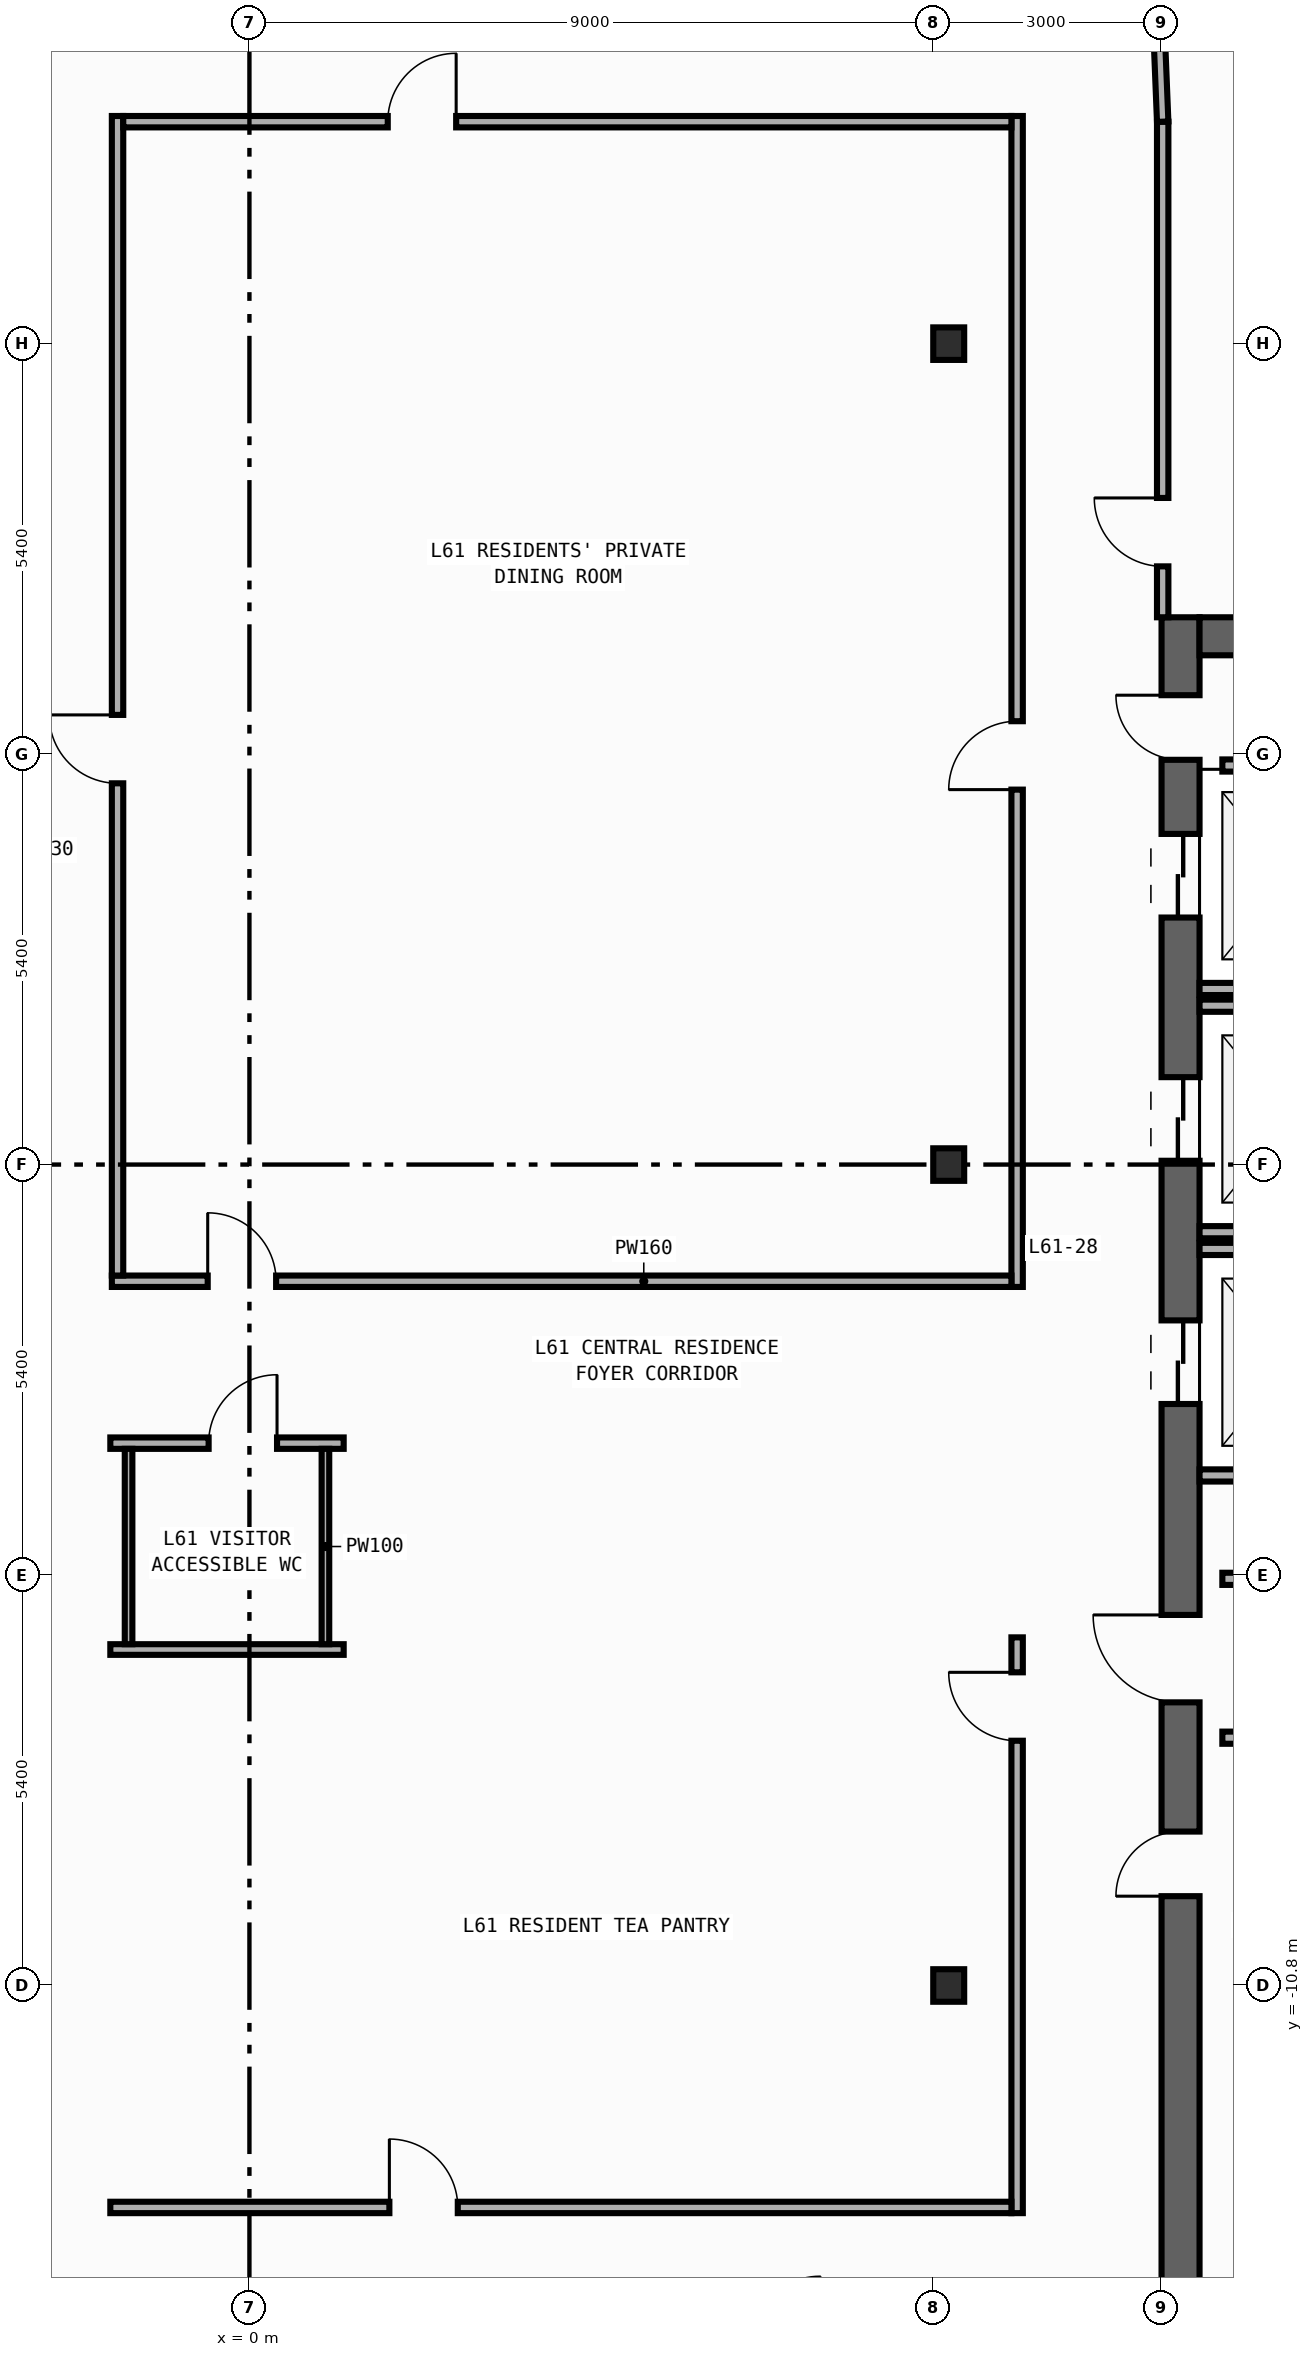
"""IFC4 building model, lengths in metres.
Left out: names, types, materials, properties, quantities, classifications, styles, units other than length and angle.
Written with IfcOpenShell. Run it as: python <this file> out.ifc"""

import sys

from ifc_helpers import new_model, si_unit, direction, frame, frame_2d, origin, origin_2d, place, context, subcontext, project, spatial, rectangle, i_section, extrude, element, fill, save


model = new_model("IFC4")
c1 = context("Model", 3, precision=1e-05, world=origin(), true_north=direction((0.0, 1.0)))
c2 = subcontext(c1, "Body", "Model", "MODEL_VIEW")
j1 = project(units=[si_unit("LENGTHUNIT", "METRE"), si_unit("PLANEANGLEUNIT", "RADIAN")], contexts=[c1])
p1 = place(None, origin())
s1 = spatial("IfcSite", under=j1, at=p1, CompositionType="ELEMENT")
p2 = place(p1, origin())
s2 = spatial("IfcBuilding", under=s1, at=p2, CompositionType="ELEMENT")
p3 = place(p2, frame((0.0, 0.0, 258.4)))
s3 = spatial("IfcBuildingStorey", under=s2, at=p3, CompositionType="ELEMENT", Elevation=258.4)
p4 = place(p3, frame((12.25, -19.8, 0.0), z_axis=(0.0, 0.0, 1.0), x_axis=(0.0, 1.0, 0.0)))
e1 = element("IfcWall", 1, at=p4, inside=s3, PredefinedType="SHEAR", context=c2, shape_type="SweptSolid", body=[
    extrude(rectangle(XDim=27.0, YDim=0.5, at=frame_2d((13.5, 0.0))), origin(), (0.0, 0.0, 1.0), 3.34),
])
p5 = place(p4, frame((23.05, 0.0, 0.0)))
e2 = element("IfcOpeningElement", 2, at=p5, cuts=e1, PredefinedType="OPENING", context=c2, shape_type="SweptSolid", body=[
    extrude(rectangle(XDim=1.1, YDim=2.2, at=frame_2d((0.55, 1.1))), frame((0.0, 0.26, 0.0), z_axis=(0.0, -1.0, 0.0), x_axis=(1.0, 0.0, 0.0)), (0.0, 0.0, 1.0), 0.52),
])
p6 = place(p4, frame((19.85, 0.0, 0.0)))
e3 = element("IfcOpeningElement", 3, at=p6, cuts=e1, PredefinedType="OPENING", context=c2, shape_type="SweptSolid", body=[
    extrude(rectangle(XDim=1.1, YDim=2.2, at=frame_2d((0.55, 1.1))), frame((0.0, 0.26, 0.0), z_axis=(0.0, -1.0, 0.0), x_axis=(1.0, 0.0, 0.0)), (0.0, 0.0, 1.0), 0.52),
])
p7 = place(p4, frame((16.65, 0.0, 0.0)))
e4 = element("IfcOpeningElement", 4, at=p7, cuts=e1, PredefinedType="OPENING", context=c2, shape_type="SweptSolid", body=[
    extrude(rectangle(XDim=1.1, YDim=2.2, at=frame_2d((0.55, 1.1))), frame((0.0, 0.26, 0.0), z_axis=(0.0, -1.0, 0.0), x_axis=(1.0, 0.0, 0.0)), (0.0, 0.0, 1.0), 0.52),
])
p8 = place(p4, frame((10.175, 0.0, 0.0)))
e5 = element("IfcOpeningElement", 5, at=p8, cuts=e1, PredefinedType="OPENING", context=c2, shape_type="SweptSolid", body=[
    extrude(rectangle(XDim=0.85, YDim=2.1, at=frame_2d((0.425, 1.05))), frame((0.0, 0.26, 0.0), z_axis=(0.0, -1.0, 0.0), x_axis=(1.0, 0.0, 0.0)), (0.0, 0.0, 1.0), 0.52),
])
p9 = place(p4, frame((12.725, 0.0, 0.0)))
e6 = element("IfcOpeningElement", 6, at=p9, cuts=e1, PredefinedType="OPENING", context=c2, shape_type="SweptSolid", body=[
    extrude(rectangle(XDim=1.15, YDim=2.2, at=frame_2d((0.575, 1.1))), frame((0.0, 0.26, 0.0), z_axis=(0.0, -1.0, 0.0), x_axis=(1.0, 0.0, 0.0)), (0.0, 0.0, 1.0), 0.52),
])
p10 = place(p4, frame((25.125, 0.0, 0.0)))
e7 = element("IfcOpeningElement", 7, at=p10, cuts=e1, PredefinedType="OPENING", context=c2, shape_type="SweptSolid", body=[
    extrude(rectangle(XDim=0.85, YDim=2.1, at=frame_2d((0.425, 1.05))), frame((0.0, 0.26, 0.0), z_axis=(0.0, -1.0, 0.0), x_axis=(1.0, 0.0, 0.0)), (0.0, 0.0, 1.0), 0.52),
])
p11 = place(p3, frame((12.5, 6.95, 0.0), z_axis=(0.0, 0.0, 1.0), x_axis=(1.0, 0.0, 0.0)))
e8 = element("IfcWall", 8, at=p11, inside=s3, PredefinedType="SHEAR", context=c2, shape_type="SweptSolid", body=[
    extrude(rectangle(XDim=7.4, YDim=0.5, at=frame_2d((3.7, 0.0))), origin(), (0.0, 0.0, 1.0), 3.34),
])
for number, where, z_axis, x_axis in (
    (9, (9.2, -10.8, 0.0), (0.0, 0.0, 1.0), (1.0, 0.0, 0.0)),
    (10, (9.2, 0.0, 0.0), (0.0, 0.0, 1.0), (1.0, 0.0, 0.0)),
    (11, (9.2, 10.8, 0.0), (0.0, 0.0, 1.0), (1.0, 0.0, 0.0)),
):
    element("IfcColumn", number, at=place(p3, frame(where, z_axis=z_axis, x_axis=x_axis)), inside=s3, PredefinedType="COLUMN", context=c2, shape_type="SweptSolid", body=[
        extrude(i_section(OverallWidth=0.407, OverallDepth=0.428, WebThickness=0.02, FlangeThickness=0.035, FilletRadius=0.022, at=origin_2d()), origin(), (0.0, 0.0, 1.0), 3.6),
    ])
for number, where, z_axis, x_axis in (
    (12, (12.5, 2.31, 0.0), (0.0, 0.0, 1.0), (1.0, 0.0, 0.0)),
    (13, (12.5, -0.89, 0.0), (0.0, 0.0, 1.0), (1.0, 0.0, 0.0)),
    (14, (12.5, 2.09, 0.0), (0.0, 0.0, 1.0), (1.0, 0.0, 0.0)),
    (15, (12.5, -4.09, 0.0), (0.0, 0.0, 1.0), (1.0, 0.0, 0.0)),
    (16, (12.5, -1.11, 0.0), (0.0, 0.0, 1.0), (1.0, 0.0, 0.0)),
):
    element("IfcWall", number, at=place(p3, frame(where, z_axis=z_axis, x_axis=x_axis)), inside=s3, PredefinedType="STANDARD", context=c2, shape_type="SweptSolid", body=[
        extrude(rectangle(XDim=2.49, YDim=0.16, at=frame_2d((1.245, 0.0))), origin(), (0.0, 0.0, 1.0), 3.34),
    ])
for number, where, z_axis, x_axis in (
    (17, (12.8, -5.45, 0.0), (0.0, 0.0, 1.0), (1.0, 0.0, 0.0)),
    (18, (12.8, -7.54, 0.0), (0.0, 0.0, 1.0), (1.0, 0.0, 0.0)),
    (19, (12.8, 5.25, 0.0), (0.0, 0.0, 1.0), (1.0, 0.0, 0.0)),
):
    element("IfcWall", number, at=place(p3, frame(where, z_axis=z_axis, x_axis=x_axis)), inside=s3, PredefinedType="STANDARD", context=c2, shape_type="SweptSolid", body=[
        extrude(rectangle(XDim=2.6, YDim=0.16, at=frame_2d((1.3, 0.0))), origin(), (0.0, 0.0, 1.0), 3.34),
    ])
p12 = place(p3, frame((12.015, 7.2, 0.0), z_axis=(0.0, 0.0, 1.0), x_axis=(0.0, 1.0, 0.0)))
e20 = element("IfcWall", 20, at=p12, inside=s3, PredefinedType="PARTITIONING", context=c2, shape_type="SweptSolid", body=[
    extrude(rectangle(XDim=6.52, YDim=0.15, at=frame_2d((3.26, 0.0))), origin(), (0.0, 0.0, 1.0), 3.34),
])
p13 = place(p12, frame((0.67, 0.0, 0.0)))
e21 = element("IfcOpeningElement", 21, at=p13, cuts=e20, PredefinedType="OPENING", context=c2, shape_type="SweptSolid", body=[
    extrude(rectangle(XDim=0.9, YDim=2.15, at=frame_2d((0.45, 1.075))), frame((0.0, 0.085, 0.0), z_axis=(0.0, -1.0, 0.0), x_axis=(1.0, 0.0, 0.0)), (0.0, 0.0, 1.0), 0.17),
])
p14 = place(p3, frame((10.1, -1.61, 0.0), z_axis=(0.0, 0.0, 1.0), x_axis=(0.0, 1.0, 0.0)))
e22 = element("IfcWall", 22, at=p14, inside=s3, PredefinedType="PARTITIONING", context=c2, shape_type="SweptSolid", body=[
    extrude(rectangle(XDim=15.405, YDim=0.15, at=frame_2d((7.703, 0.0))), origin(), (0.0, 0.0, 1.0), 3.34),
])
p15 = place(p14, frame((6.543, 0.0, 0.0)))
e23 = element("IfcOpeningElement", 23, at=p15, cuts=e22, PredefinedType="OPENING", context=c2, shape_type="SweptSolid", body=[
    extrude(rectangle(XDim=0.9, YDim=2.15, at=frame_2d((0.45, 1.075))), frame((0.0, 0.085, 0.0), z_axis=(0.0, -1.0, 0.0), x_axis=(1.0, 0.0, 0.0)), (0.0, 0.0, 1.0), 0.17),
])
p16 = place(p3, frame((10.1, -13.795, 0.0), z_axis=(0.0, 0.0, 1.0), x_axis=(0.0, 1.0, 0.0)))
e24 = element("IfcWall", 24, at=p16, inside=s3, PredefinedType="PARTITIONING", context=c2, shape_type="SweptSolid", body=[
    extrude(rectangle(XDim=7.575, YDim=0.15, at=frame_2d((3.788, 0.0))), origin(), (0.0, 0.0, 1.0), 3.34),
])
p17 = place(p16, frame((6.215, 0.0, 0.0)))
e25 = element("IfcOpeningElement", 25, at=p17, cuts=e24, PredefinedType="OPENING", context=c2, shape_type="SweptSolid", body=[
    extrude(rectangle(XDim=0.9, YDim=2.15, at=frame_2d((0.45, 1.075))), frame((0.0, 0.085, 0.0), z_axis=(0.0, -1.0, 0.0), x_axis=(1.0, 0.0, 0.0)), (0.0, 0.0, 1.0), 0.17),
])
p18 = place(p3, frame((-1.81, -1.535, 0.0), z_axis=(0.0, 0.0, 1.0), x_axis=(1.0, 0.0, 0.0)))
e26 = element("IfcWall", 26, at=p18, inside=s3, PredefinedType="PARTITIONING", context=c2, shape_type="SweptSolid", body=[
    extrude(rectangle(XDim=11.835, YDim=0.15, at=frame_2d((5.917, 0.0))), origin(), (0.0, 0.0, 1.0), 3.34),
])
p19 = place(p18, frame((1.261, 0.0, 0.0)))
e27 = element("IfcOpeningElement", 27, at=p19, cuts=e26, PredefinedType="OPENING", context=c2, shape_type="SweptSolid", body=[
    extrude(rectangle(XDim=0.9, YDim=2.15, at=frame_2d((0.45, 1.075))), frame((0.0, 0.085, 0.0), z_axis=(0.0, -1.0, 0.0), x_axis=(1.0, 0.0, 0.0)), (0.0, 0.0, 1.0), 0.17),
])
p20 = place(p3, frame((-1.83, -3.665, 0.0), z_axis=(0.0, 0.0, 1.0), x_axis=(1.0, 0.0, 0.0)))
e28 = element("IfcWall", 28, at=p20, inside=s3, PredefinedType="PARTITIONING", context=c2, shape_type="SweptSolid", body=[
    extrude(rectangle(XDim=3.07, YDim=0.15, at=frame_2d((1.535, 0.0))), origin(), (0.0, 0.0, 1.0), 3.34),
])
p21 = place(p20, frame((1.293, 0.0, 0.0)))
e29 = element("IfcOpeningElement", 29, at=p21, cuts=e28, PredefinedType="OPENING", context=c2, shape_type="SweptSolid", body=[
    extrude(rectangle(XDim=0.9, YDim=2.15, at=frame_2d((0.45, 1.075))), frame((0.0, 0.085, 0.0), z_axis=(0.0, -1.0, 0.0), x_axis=(1.0, 0.0, 0.0)), (0.0, 0.0, 1.0), 0.17),
])
p22 = place(p3, frame((-1.735, -1.46, 0.0), z_axis=(0.0, 0.0, 1.0), x_axis=(0.0, 1.0, 0.0)))
e30 = element("IfcWall", 30, at=p22, inside=s3, PredefinedType="PARTITIONING", context=c2, shape_type="SweptSolid", body=[
    extrude(rectangle(XDim=15.255, YDim=0.15, at=frame_2d((7.627, 0.0))), origin(), (0.0, 0.0, 1.0), 3.34),
])
p23 = place(p22, frame((6.476, 0.0, 0.0)))
e31 = element("IfcOpeningElement", 31, at=p23, cuts=e30, PredefinedType="OPENING", context=c2, shape_type="SweptSolid", body=[
    extrude(rectangle(XDim=0.9, YDim=2.15, at=frame_2d((0.45, 1.075))), frame((0.0, 0.085, 0.0), z_axis=(0.0, -1.0, 0.0), x_axis=(1.0, 0.0, 0.0)), (0.0, 0.0, 1.0), 0.17),
])
p24 = place(p3, frame((12.015, 13.72, 0.0), z_axis=(0.0, 0.0, 1.0), x_axis=(-0.040046877756, 0.99919780203, 0.0)))
e32 = element("IfcWall", 32, at=p24, inside=s3, PredefinedType="PARTITIONING", context=c2, shape_type="SweptSolid", body=[
    extrude(rectangle(XDim=1.731, YDim=0.15, at=frame_2d((0.866, 0.0))), origin(), (0.0, 0.0, 1.0), 3.34),
])
p25 = place(p3, frame((-1.66, 13.72, 0.0), z_axis=(0.0, 0.0, 1.0), x_axis=(1.0, 0.0, 0.0)))
e33 = element("IfcWall", 33, at=p25, inside=s3, PredefinedType="PARTITIONING", context=c2, shape_type="SweptSolid", body=[
    extrude(rectangle(XDim=11.685, YDim=0.15, at=frame_2d((5.842, 0.0))), origin(), (0.0, 0.0, 1.0), 3.34),
])
p26 = place(p25, frame((3.48, 0.0, 0.0)))
e34 = element("IfcOpeningElement", 34, at=p26, cuts=e33, PredefinedType="OPENING", context=c2, shape_type="SweptSolid", body=[
    extrude(rectangle(XDim=0.9, YDim=2.15, at=frame_2d((0.45, 1.075))), frame((0.0, 0.085, 0.0), z_axis=(0.0, -1.0, 0.0), x_axis=(1.0, 0.0, 0.0)), (0.0, 0.0, 1.0), 0.17),
])
p27 = place(p3, frame((-1.83, -13.72, 0.0), z_axis=(0.0, 0.0, 1.0), x_axis=(1.0, 0.0, 0.0)))
e35 = element("IfcWall", 35, at=p27, inside=s3, PredefinedType="PARTITIONING", context=c2, shape_type="SweptSolid", body=[
    extrude(rectangle(XDim=11.855, YDim=0.15, at=frame_2d((5.927, 0.0))), origin(), (0.0, 0.0, 1.0), 3.34),
])
p28 = place(p27, frame((3.671, 0.0, 0.0)))
e36 = element("IfcOpeningElement", 36, at=p28, cuts=e35, PredefinedType="OPENING", context=c2, shape_type="SweptSolid", body=[
    extrude(rectangle(XDim=0.9, YDim=2.15, at=frame_2d((0.45, 1.075))), frame((0.0, 0.085, 0.0), z_axis=(0.0, -1.0, 0.0), x_axis=(1.0, 0.0, 0.0)), (0.0, 0.0, 1.0), 0.17),
])
p29 = place(p3, frame((-1.83, -6.38, 0.0), z_axis=(0.0, 0.0, 1.0), x_axis=(1.0, 0.0, 0.0)))
e37 = element("IfcWall", 37, at=p29, inside=s3, PredefinedType="PARTITIONING", context=c2, shape_type="SweptSolid", body=[
    extrude(rectangle(XDim=3.07, YDim=0.14, at=frame_2d((1.535, 0.0))), origin(), (0.0, 0.0, 1.0), 3.34),
])
for number, where, z_axis, x_axis in (
    (38, (1.0, -3.74, 0.0), (0.0, 0.0, 1.0), (0.0, -1.0, 0.0)),
    (39, (-1.59, -6.31, 0.0), (0.0, 0.0, 1.0), (0.0, 1.0, 0.0)),
):
    element("IfcWall", number, at=place(p3, frame(where, z_axis=z_axis, x_axis=x_axis)), inside=s3, PredefinedType="PARTITIONING", context=c2, shape_type="SweptSolid", body=[
        extrude(rectangle(XDim=2.57, YDim=0.1, at=frame_2d((1.285, 0.0))), origin(), (0.0, 0.0, 1.0), 3.34),
    ])
p30 = place(p5, origin())
e40 = element("IfcDoor", 40, at=p30, inside=s3, OperationType="DOUBLE_DOOR_SLIDING", PredefinedType="DOOR", context=c2, shape_type="SweptSolid", body=[
    extrude(rectangle(XDim=1.1, YDim=2.2, at=frame_2d((0.55, 1.1))), frame((0.0, 0.025, 0.0), z_axis=(0.0, -1.0, 0.0), x_axis=(1.0, 0.0, 0.0)), (0.0, 0.0, 1.0), 0.05),
])
fill(e2, e40)
p31 = place(p6, origin())
e41 = element("IfcDoor", 41, at=p31, inside=s3, OperationType="DOUBLE_DOOR_SLIDING", PredefinedType="DOOR", context=c2, shape_type="SweptSolid", body=[
    extrude(rectangle(XDim=1.1, YDim=2.2, at=frame_2d((0.55, 1.1))), frame((0.0, 0.025, 0.0), z_axis=(0.0, -1.0, 0.0), x_axis=(1.0, 0.0, 0.0)), (0.0, 0.0, 1.0), 0.05),
])
fill(e3, e41)
p32 = place(p7, origin())
e42 = element("IfcDoor", 42, at=p32, inside=s3, OperationType="DOUBLE_DOOR_SLIDING", PredefinedType="DOOR", context=c2, shape_type="SweptSolid", body=[
    extrude(rectangle(XDim=1.1, YDim=2.2, at=frame_2d((0.55, 1.1))), frame((0.0, 0.025, 0.0), z_axis=(0.0, -1.0, 0.0), x_axis=(1.0, 0.0, 0.0)), (0.0, 0.0, 1.0), 0.05),
])
fill(e4, e42)
p33 = place(p8, origin())
e43 = element("IfcDoor", 43, at=p33, inside=s3, OperationType="SINGLE_SWING_LEFT", PredefinedType="DOOR", context=c2, shape_type="SweptSolid", body=[
    extrude(rectangle(XDim=0.85, YDim=2.1, at=frame_2d((0.425, 1.05))), frame((0.0, 0.025, 0.0), z_axis=(0.0, -1.0, 0.0), x_axis=(1.0, 0.0, 0.0)), (0.0, 0.0, 1.0), 0.05),
])
fill(e5, e43)
p34 = place(p9, origin())
e44 = element("IfcDoor", 44, at=p34, inside=s3, OperationType="SINGLE_SWING_RIGHT", PredefinedType="DOOR", context=c2, shape_type="SweptSolid", body=[
    extrude(rectangle(XDim=1.15, YDim=2.2, at=frame_2d((0.575, 1.1))), frame((0.0, 0.025, 0.0), z_axis=(0.0, -1.0, 0.0), x_axis=(1.0, 0.0, 0.0)), (0.0, 0.0, 1.0), 0.05),
])
fill(e6, e44)
p35 = place(p10, origin())
e45 = element("IfcDoor", 45, at=p35, inside=s3, OperationType="SINGLE_SWING_RIGHT", PredefinedType="DOOR", context=c2, shape_type="SweptSolid", body=[
    extrude(rectangle(XDim=0.85, YDim=2.1, at=frame_2d((0.425, 1.05))), frame((0.0, 0.025, 0.0), z_axis=(0.0, -1.0, 0.0), x_axis=(1.0, 0.0, 0.0)), (0.0, 0.0, 1.0), 0.05),
])
fill(e7, e45)
p36 = place(p13, origin())
e46 = element("IfcDoor", 46, at=p36, inside=s3, OperationType="SINGLE_SWING_RIGHT", PredefinedType="DOOR", context=c2, shape_type="SweptSolid", body=[
    extrude(rectangle(XDim=0.9, YDim=2.15, at=frame_2d((0.45, 1.075))), frame((0.0, 0.025, 0.0), z_axis=(0.0, -1.0, 0.0), x_axis=(1.0, 0.0, 0.0)), (0.0, 0.0, 1.0), 0.05),
])
fill(e21, e46)
p37 = place(p15, origin())
e47 = element("IfcDoor", 47, at=p37, inside=s3, OperationType="SINGLE_SWING_LEFT", PredefinedType="DOOR", context=c2, shape_type="SweptSolid", body=[
    extrude(rectangle(XDim=0.9, YDim=2.15, at=frame_2d((0.45, 1.075))), frame((0.0, 0.025, 0.0), z_axis=(0.0, -1.0, 0.0), x_axis=(1.0, 0.0, 0.0)), (0.0, 0.0, 1.0), 0.05),
])
fill(e23, e47)
p38 = place(p17, origin())
e48 = element("IfcDoor", 48, at=p38, inside=s3, OperationType="SINGLE_SWING_RIGHT", PredefinedType="DOOR", context=c2, shape_type="SweptSolid", body=[
    extrude(rectangle(XDim=0.9, YDim=2.15, at=frame_2d((0.45, 1.075))), frame((0.0, 0.025, 0.0), z_axis=(0.0, -1.0, 0.0), x_axis=(1.0, 0.0, 0.0)), (0.0, 0.0, 1.0), 0.05),
])
fill(e25, e48)
p39 = place(p19, origin())
e49 = element("IfcDoor", 49, at=p39, inside=s3, OperationType="SINGLE_SWING_LEFT", PredefinedType="DOOR", context=c2, shape_type="SweptSolid", body=[
    extrude(rectangle(XDim=0.9, YDim=2.15, at=frame_2d((0.45, 1.075))), frame((0.0, 0.025, 0.0), z_axis=(0.0, -1.0, 0.0), x_axis=(1.0, 0.0, 0.0)), (0.0, 0.0, 1.0), 0.05),
])
fill(e27, e49)
p40 = place(p21, origin())
e50 = element("IfcDoor", 50, at=p40, inside=s3, OperationType="SINGLE_SWING_RIGHT", PredefinedType="DOOR", context=c2, shape_type="SweptSolid", body=[
    extrude(rectangle(XDim=0.9, YDim=2.15, at=frame_2d((0.45, 1.075))), frame((0.0, 0.025, 0.0), z_axis=(0.0, -1.0, 0.0), x_axis=(1.0, 0.0, 0.0)), (0.0, 0.0, 1.0), 0.05),
])
fill(e29, e50)
p41 = place(p23, origin())
e51 = element("IfcDoor", 51, at=p41, inside=s3, OperationType="SINGLE_SWING_RIGHT", PredefinedType="DOOR", context=c2, shape_type="SweptSolid", body=[
    extrude(rectangle(XDim=0.9, YDim=2.15, at=frame_2d((0.45, 1.075))), frame((0.0, 0.025, 0.0), z_axis=(0.0, -1.0, 0.0), x_axis=(1.0, 0.0, 0.0)), (0.0, 0.0, 1.0), 0.05),
])
fill(e31, e51)
p42 = place(p26, origin())
e52 = element("IfcDoor", 52, at=p42, inside=s3, OperationType="SINGLE_SWING_RIGHT", PredefinedType="DOOR", context=c2, shape_type="SweptSolid", body=[
    extrude(rectangle(XDim=0.9, YDim=2.15, at=frame_2d((0.45, 1.075))), frame((0.0, 0.025, 0.0), z_axis=(0.0, -1.0, 0.0), x_axis=(1.0, 0.0, 0.0)), (0.0, 0.0, 1.0), 0.05),
])
fill(e34, e52)
p43 = place(p28, origin())
e53 = element("IfcDoor", 53, at=p43, inside=s3, OperationType="SINGLE_SWING_LEFT", PredefinedType="DOOR", context=c2, shape_type="SweptSolid", body=[
    extrude(rectangle(XDim=0.9, YDim=2.15, at=frame_2d((0.45, 1.075))), frame((0.0, 0.025, 0.0), z_axis=(0.0, -1.0, 0.0), x_axis=(1.0, 0.0, 0.0)), (0.0, 0.0, 1.0), 0.05),
])
fill(e36, e53)
save(model, sys.argv[1])
